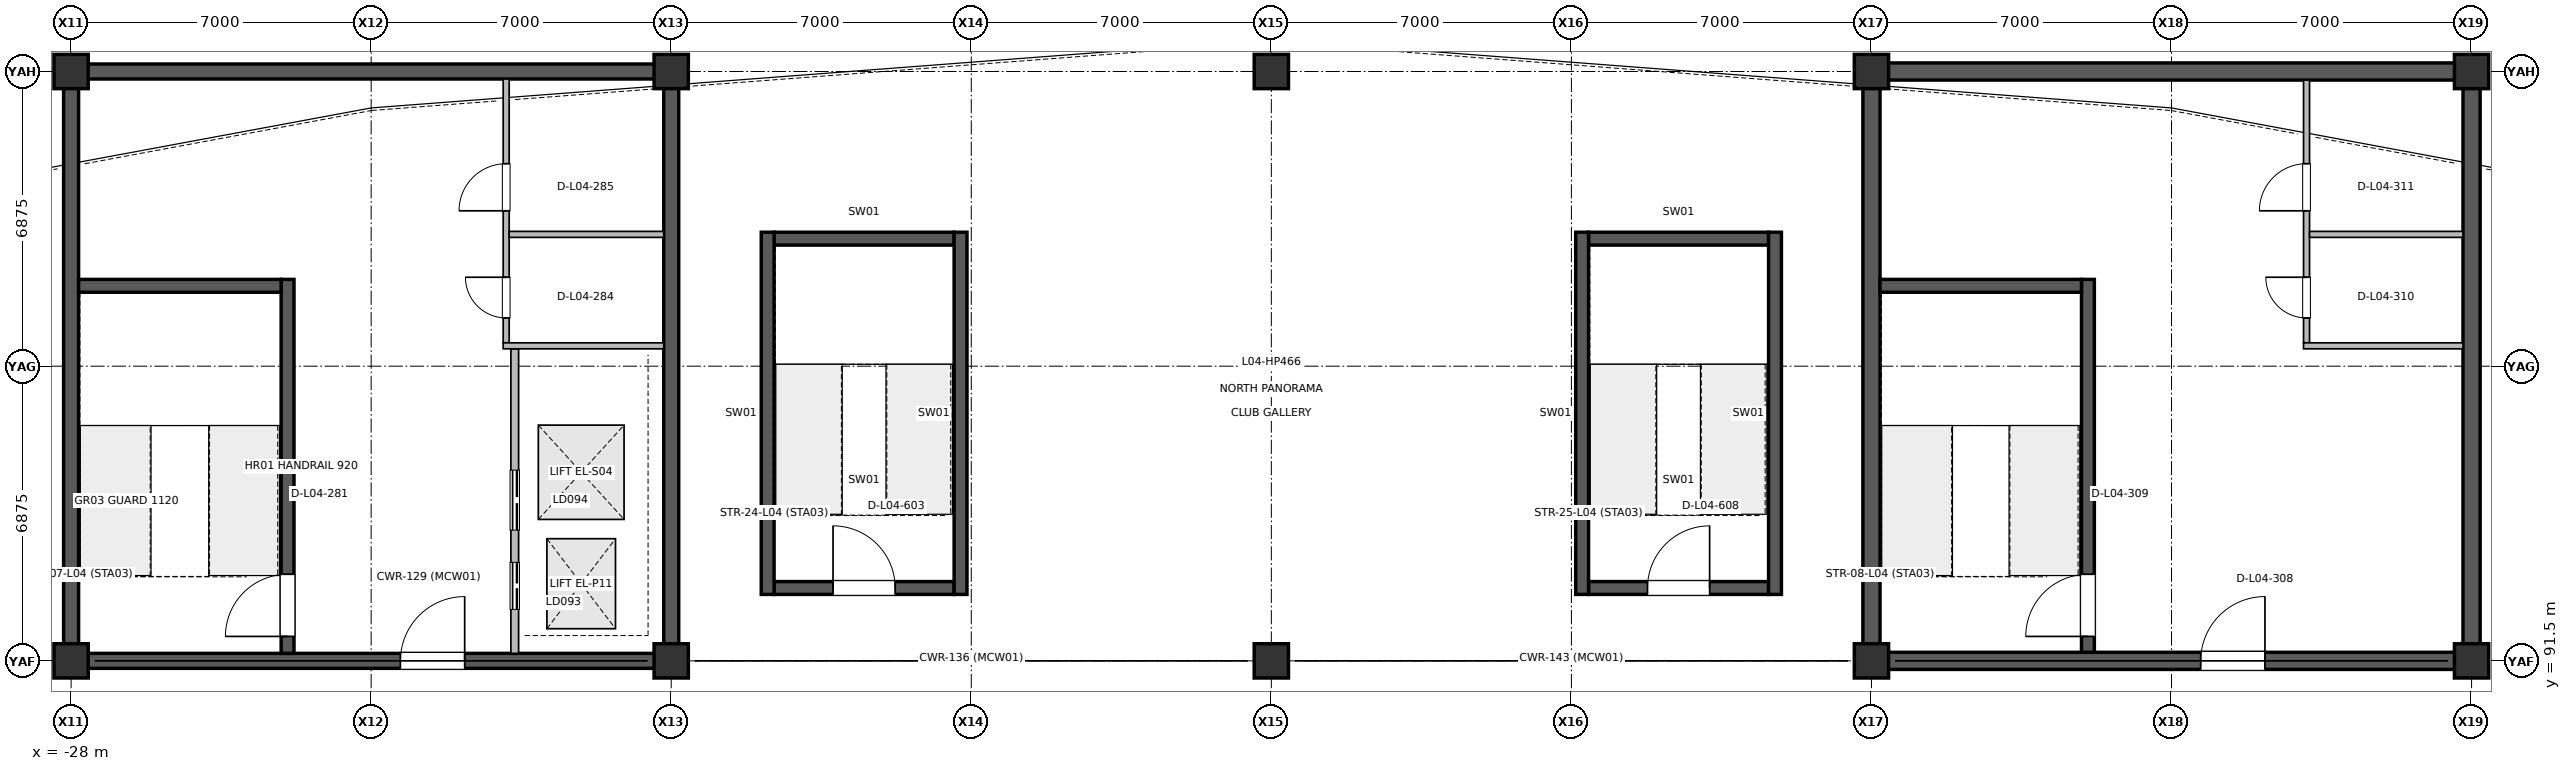
"""IFC4 building model, lengths in metres.
Left out: names, types, materials, properties, quantities, classifications, styles, units other than length and angle.
Written with IfcOpenShell. Run it as: python <this file> out.ifc"""

import sys

from ifc_helpers import new_model, si_unit, direction, frame, frame_2d, origin, origin_2d, place, context, subcontext, project, spatial, rectangle, circle, extrude, element, fill, save


model = new_model("IFC4")
c1 = context("Model", 3, precision=1e-05, world=origin(), true_north=direction((0.0, 1.0)))
c2 = subcontext(c1, "Body", "Model", "MODEL_VIEW")
j1 = project(units=[si_unit("LENGTHUNIT", "METRE"), si_unit("PLANEANGLEUNIT", "RADIAN")], contexts=[c1])
p1 = place(None, origin())
s1 = spatial("IfcSite", under=j1, at=p1, CompositionType="ELEMENT")
p2 = place(p1, origin())
s2 = spatial("IfcBuilding", under=s1, at=p2, CompositionType="ELEMENT")
p3 = place(p2, frame((0.0, 0.0, 16.2)))
s3 = spatial("IfcBuildingStorey", under=s2, at=p3, CompositionType="ELEMENT", Elevation=16.2)
for number, where, z_axis, x_axis in (
    (1, (-28.0, 91.5, 0.0), (0.0, 0.0, 1.0), (1.0, 0.0, 0.0)),
    (2, (-28.0, 105.25, 0.0), (0.0, 0.0, 1.0), (1.0, 0.0, 0.0)),
    (3, (-14.0, 91.5, 0.0), (0.0, 0.0, 1.0), (1.0, 0.0, 0.0)),
    (4, (-14.0, 105.25, 0.0), (0.0, 0.0, 1.0), (1.0, 0.0, 0.0)),
    (5, (0.0, 91.5, 0.0), (0.0, 0.0, 1.0), (1.0, 0.0, 0.0)),
    (6, (0.0, 105.25, 0.0), (0.0, 0.0, 1.0), (1.0, 0.0, 0.0)),
    (7, (14.0, 91.5, 0.0), (0.0, 0.0, 1.0), (1.0, 0.0, 0.0)),
    (8, (14.0, 105.25, 0.0), (0.0, 0.0, 1.0), (1.0, 0.0, 0.0)),
    (9, (28.0, 91.5, 0.0), (0.0, 0.0, 1.0), (1.0, 0.0, 0.0)),
    (10, (28.0, 105.25, 0.0), (0.0, 0.0, 1.0), (1.0, 0.0, 0.0)),
):
    element("IfcColumn", number, at=place(p3, frame(where, z_axis=z_axis, x_axis=x_axis)), inside=s3, PredefinedType="COLUMN", context=c2, shape_type="SweptSolid", body=[
        extrude(circle(Radius=0.4, at=origin_2d()), origin(), (0.0, 0.0, 1.0), 4.798),
    ])
for number, where, z_axis, x_axis in (
    (11, (-28.0, 91.675, 0.0), (0.0, 0.0, 1.0), (0.0, 1.0, 0.0)),
    (12, (-14.0, 91.675, 0.0), (0.0, 0.0, 1.0), (0.0, 1.0, 0.0)),
):
    element("IfcWall", number, at=place(p3, frame(where, z_axis=z_axis, x_axis=x_axis)), inside=s3, PredefinedType="SHEAR", context=c2, shape_type="SweptSolid", body=[
        extrude(rectangle(XDim=13.4, YDim=0.35, at=frame_2d((6.7, 0.0))), origin(), (0.0, 0.0, 1.0), 4.62),
    ])
p4 = place(p3, frame((-27.825, 91.5, 0.0), z_axis=(0.0, 0.0, 1.0), x_axis=(1.0, 0.0, 0.0)))
e13 = element("IfcWall", 13, at=p4, inside=s3, PredefinedType="SHEAR", context=c2, shape_type="SweptSolid", body=[
    extrude(rectangle(XDim=13.65, YDim=0.35, at=frame_2d((6.825, 0.0))), origin(), (0.0, 0.0, 1.0), 4.62),
])
p5 = place(p4, frame((7.507, 0.0, 0.0)))
e14 = element("IfcOpeningElement", 14, at=p5, cuts=e13, PredefinedType="OPENING", context=c2, shape_type="SweptSolid", body=[
    extrude(rectangle(XDim=1.5, YDim=2.2, at=frame_2d((0.75, 1.1))), frame((0.0, 0.185, 0.0), z_axis=(0.0, -1.0, 0.0), x_axis=(1.0, 0.0, 0.0)), (0.0, 0.0, 1.0), 0.37),
])
p6 = place(p3, frame((-27.825, 105.25, 0.0), z_axis=(0.0, 0.0, 1.0), x_axis=(1.0, 0.0, 0.0)))
e15 = element("IfcWall", 15, at=p6, inside=s3, PredefinedType="SHEAR", context=c2, shape_type="SweptSolid", body=[
    extrude(rectangle(XDim=13.65, YDim=0.35, at=frame_2d((6.825, 0.0))), origin(), (0.0, 0.0, 1.0), 4.62),
])
for number, where, z_axis, x_axis in (
    (16, (14.0, 91.7, 0.0), (0.0, 0.0, 1.0), (0.0, 1.0, 0.0)),
    (17, (28.0, 91.7, 0.0), (0.0, 0.0, 1.0), (0.0, 1.0, 0.0)),
):
    element("IfcWall", number, at=place(p3, frame(where, z_axis=z_axis, x_axis=x_axis)), inside=s3, PredefinedType="SHEAR", context=c2, shape_type="SweptSolid", body=[
        extrude(rectangle(XDim=13.35, YDim=0.4, at=frame_2d((6.675, 0.0))), origin(), (0.0, 0.0, 1.0), 4.62),
    ])
p7 = place(p3, frame((14.2, 91.5, 0.0), z_axis=(0.0, 0.0, 1.0), x_axis=(1.0, 0.0, 0.0)))
e18 = element("IfcWall", 18, at=p7, inside=s3, PredefinedType="SHEAR", context=c2, shape_type="SweptSolid", body=[
    extrude(rectangle(XDim=13.6, YDim=0.4, at=frame_2d((6.8, 0.0))), origin(), (0.0, 0.0, 1.0), 4.62),
])
p8 = place(p7, frame((7.48, 0.0, 0.0)))
e19 = element("IfcOpeningElement", 19, at=p8, cuts=e18, PredefinedType="OPENING", context=c2, shape_type="SweptSolid", body=[
    extrude(rectangle(XDim=1.5, YDim=2.2, at=frame_2d((0.75, 1.1))), frame((0.0, 0.21, 0.0), z_axis=(0.0, -1.0, 0.0), x_axis=(1.0, 0.0, 0.0)), (0.0, 0.0, 1.0), 0.42),
])
p9 = place(p3, frame((14.2, 105.25, 0.0), z_axis=(0.0, 0.0, 1.0), x_axis=(1.0, 0.0, 0.0)))
e20 = element("IfcWall", 20, at=p9, inside=s3, PredefinedType="SHEAR", context=c2, shape_type="SweptSolid", body=[
    extrude(rectangle(XDim=13.6, YDim=0.4, at=frame_2d((6.8, 0.0))), origin(), (0.0, 0.0, 1.0), 4.62),
])
p10 = place(p3, frame((-22.95, 91.675, 0.0), z_axis=(0.0, 0.0, 1.0), x_axis=(0.0, 1.0, 0.0)))
e21 = element("IfcWall", 21, at=p10, inside=s3, PredefinedType="SHEAR", context=c2, shape_type="SweptSolid", body=[
    extrude(rectangle(XDim=8.725, YDim=0.3, at=frame_2d((4.362, 0.0))), origin(), (0.0, 0.0, 1.0), 4.62),
])
p11 = place(p10, frame((0.395, 0.0, 0.0)))
e22 = element("IfcOpeningElement", 22, at=p11, cuts=e21, PredefinedType="OPENING", context=c2, shape_type="SweptSolid", body=[
    extrude(rectangle(XDim=1.45, YDim=2.2, at=frame_2d((0.725, 1.1))), frame((0.0, 0.16, 0.0), z_axis=(0.0, -1.0, 0.0), x_axis=(1.0, 0.0, 0.0)), (0.0, 0.0, 1.0), 0.32),
])
p12 = place(p3, frame((-17.65, 91.675, 0.0), z_axis=(0.0, 0.0, 1.0), x_axis=(0.0, 1.0, 0.0)))
e23 = element("IfcWall", 23, at=p12, inside=s3, PredefinedType="PARTITIONING", context=c2, shape_type="SweptSolid", body=[
    extrude(rectangle(XDim=7.105, YDim=0.18, at=frame_2d((3.552, 0.0))), origin(), (0.0, 0.0, 1.0), 3.82),
])
p13 = place(p12, frame((1.025, 0.0, 0.0)))
e24 = element("IfcOpeningElement", 24, at=p13, cuts=e23, PredefinedType="OPENING", context=c2, shape_type="SweptSolid", body=[
    extrude(rectangle(XDim=1.1, YDim=2.2, at=frame_2d((0.55, 1.1))), frame((0.0, 0.1, 0.0), z_axis=(0.0, -1.0, 0.0), x_axis=(1.0, 0.0, 0.0)), (0.0, 0.0, 1.0), 0.2),
])
p14 = place(p12, frame((2.875, 0.0, 0.0)))
e25 = element("IfcOpeningElement", 25, at=p14, cuts=e23, PredefinedType="OPENING", context=c2, shape_type="SweptSolid", body=[
    extrude(rectangle(XDim=1.4, YDim=2.3, at=frame_2d((0.7, 1.15))), frame((0.0, 0.1, 0.0), z_axis=(0.0, -1.0, 0.0), x_axis=(1.0, 0.0, 0.0)), (0.0, 0.0, 1.0), 0.2),
])
p15 = place(p3, frame((-17.85, 98.92, 0.0), z_axis=(0.0, 0.0, 1.0), x_axis=(0.0, 1.0, 0.0)))
e26 = element("IfcWall", 26, at=p15, inside=s3, PredefinedType="PARTITIONING", context=c2, shape_type="SweptSolid", body=[
    extrude(rectangle(XDim=6.155, YDim=0.14, at=frame_2d((3.078, 0.0))), origin(), (0.0, 0.0, 1.0), 3.82),
])
p16 = place(p15, frame((0.58, 0.0, 0.0)))
e27 = element("IfcOpeningElement", 27, at=p16, cuts=e26, PredefinedType="OPENING", context=c2, shape_type="SweptSolid", body=[
    extrude(rectangle(XDim=0.95, YDim=2.15, at=frame_2d((0.475, 1.075))), frame((0.0, 0.08, 0.0), z_axis=(0.0, -1.0, 0.0), x_axis=(1.0, 0.0, 0.0)), (0.0, 0.0, 1.0), 0.16),
])
p17 = place(p15, frame((3.08, 0.0, 0.0)))
e28 = element("IfcOpeningElement", 28, at=p17, cuts=e26, PredefinedType="OPENING", context=c2, shape_type="SweptSolid", body=[
    extrude(rectangle(XDim=1.1, YDim=2.15, at=frame_2d((0.55, 1.075))), frame((0.0, 0.08, 0.0), z_axis=(0.0, -1.0, 0.0), x_axis=(1.0, 0.0, 0.0)), (0.0, 0.0, 1.0), 0.16),
])
p18 = place(p3, frame((19.05, 91.7, 0.0), z_axis=(0.0, 0.0, 1.0), x_axis=(0.0, 1.0, 0.0)))
e29 = element("IfcWall", 29, at=p18, inside=s3, PredefinedType="SHEAR", context=c2, shape_type="SweptSolid", body=[
    extrude(rectangle(XDim=8.7, YDim=0.3, at=frame_2d((4.35, 0.0))), origin(), (0.0, 0.0, 1.0), 4.62),
])
p19 = place(p18, frame((0.37, 0.0, 0.0)))
e30 = element("IfcOpeningElement", 30, at=p19, cuts=e29, PredefinedType="OPENING", context=c2, shape_type="SweptSolid", body=[
    extrude(rectangle(XDim=1.45, YDim=2.2, at=frame_2d((0.725, 1.1))), frame((0.0, 0.16, 0.0), z_axis=(0.0, -1.0, 0.0), x_axis=(1.0, 0.0, 0.0)), (0.0, 0.0, 1.0), 0.32),
])
p20 = place(p3, frame((24.15, 98.92, 0.0), z_axis=(0.0, 0.0, 1.0), x_axis=(0.0, 1.0, 0.0)))
e31 = element("IfcWall", 31, at=p20, inside=s3, PredefinedType="PARTITIONING", context=c2, shape_type="SweptSolid", body=[
    extrude(rectangle(XDim=6.13, YDim=0.14, at=frame_2d((3.065, 0.0))), origin(), (0.0, 0.0, 1.0), 3.82),
])
p21 = place(p20, frame((0.58, 0.0, 0.0)))
e32 = element("IfcOpeningElement", 32, at=p21, cuts=e31, PredefinedType="OPENING", context=c2, shape_type="SweptSolid", body=[
    extrude(rectangle(XDim=0.95, YDim=2.15, at=frame_2d((0.475, 1.075))), frame((0.0, 0.08, 0.0), z_axis=(0.0, -1.0, 0.0), x_axis=(1.0, 0.0, 0.0)), (0.0, 0.0, 1.0), 0.16),
])
p22 = place(p20, frame((3.08, 0.0, 0.0)))
e33 = element("IfcOpeningElement", 33, at=p22, cuts=e31, PredefinedType="OPENING", context=c2, shape_type="SweptSolid", body=[
    extrude(rectangle(XDim=1.1, YDim=2.15, at=frame_2d((0.55, 1.075))), frame((0.0, 0.08, 0.0), z_axis=(0.0, -1.0, 0.0), x_axis=(1.0, 0.0, 0.0)), (0.0, 0.0, 1.0), 0.16),
])
p23 = place(p3, frame((-17.92, 98.85, 0.0), z_axis=(0.0, 0.0, 1.0), x_axis=(1.0, 0.0, 0.0)))
e34 = element("IfcWall", 34, at=p23, inside=s3, PredefinedType="PARTITIONING", context=c2, shape_type="SweptSolid", body=[
    extrude(rectangle(XDim=3.745, YDim=0.14, at=frame_2d((1.873, 0.0))), origin(), (0.0, 0.0, 1.0), 3.82),
])
p24 = place(p3, frame((-17.78, 101.45, 0.0), z_axis=(0.0, 0.0, 1.0), x_axis=(1.0, 0.0, 0.0)))
e35 = element("IfcWall", 35, at=p24, inside=s3, PredefinedType="PARTITIONING", context=c2, shape_type="SweptSolid", body=[
    extrude(rectangle(XDim=3.605, YDim=0.14, at=frame_2d((1.802, 0.0))), origin(), (0.0, 0.0, 1.0), 3.82),
])
p25 = place(p3, frame((24.08, 98.85, 0.0), z_axis=(0.0, 0.0, 1.0), x_axis=(1.0, 0.0, 0.0)))
e36 = element("IfcWall", 36, at=p25, inside=s3, PredefinedType="PARTITIONING", context=c2, shape_type="SweptSolid", body=[
    extrude(rectangle(XDim=3.72, YDim=0.14, at=frame_2d((1.86, 0.0))), origin(), (0.0, 0.0, 1.0), 3.82),
])
p26 = place(p3, frame((24.22, 101.45, 0.0), z_axis=(0.0, 0.0, 1.0), x_axis=(1.0, 0.0, 0.0)))
e37 = element("IfcWall", 37, at=p26, inside=s3, PredefinedType="PARTITIONING", context=c2, shape_type="SweptSolid", body=[
    extrude(rectangle(XDim=3.58, YDim=0.14, at=frame_2d((1.79, 0.0))), origin(), (0.0, 0.0, 1.0), 3.82),
])
p27 = place(p3, frame((-27.825, 100.25, 0.0), z_axis=(0.0, 0.0, 1.0), x_axis=(1.0, 0.0, 0.0)))
e38 = element("IfcWall", 38, at=p27, inside=s3, PredefinedType="SHEAR", context=c2, shape_type="SweptSolid", body=[
    extrude(rectangle(XDim=4.725, YDim=0.3, at=frame_2d((2.362, 0.0))), origin(), (0.0, 0.0, 1.0), 4.62),
])
p28 = place(p3, frame((14.2, 100.25, 0.0), z_axis=(0.0, 0.0, 1.0), x_axis=(1.0, 0.0, 0.0)))
e39 = element("IfcWall", 39, at=p28, inside=s3, PredefinedType="SHEAR", context=c2, shape_type="SweptSolid", body=[
    extrude(rectangle(XDim=4.7, YDim=0.3, at=frame_2d((2.35, 0.0))), origin(), (0.0, 0.0, 1.0), 4.62),
])
p29 = place(p3, frame((-11.6, 93.2, 0.0), z_axis=(0.0, 0.0, 1.0), x_axis=(1.0, 0.0, 0.0)))
e40 = element("IfcWall", 40, at=p29, inside=s3, PredefinedType="SHEAR", context=c2, shape_type="SweptSolid", body=[
    extrude(rectangle(XDim=4.2, YDim=0.3, at=frame_2d((2.1, 0.0))), origin(), (0.0, 0.0, 1.0), 4.62),
])
p30 = place(p29, frame((1.375, 0.0, 0.0)))
e41 = element("IfcOpeningElement", 41, at=p30, cuts=e40, PredefinedType="OPENING", context=c2, shape_type="SweptSolid", body=[
    extrude(rectangle(XDim=1.45, YDim=2.2, at=frame_2d((0.725, 1.1))), frame((0.0, 0.16, 0.0), z_axis=(0.0, -1.0, 0.0), x_axis=(1.0, 0.0, 0.0)), (0.0, 0.0, 1.0), 0.32),
])
p31 = place(p3, frame((-11.6, 101.35, 0.0), z_axis=(0.0, 0.0, 1.0), x_axis=(1.0, 0.0, 0.0)))
e42 = element("IfcWall", 42, at=p31, inside=s3, PredefinedType="SHEAR", context=c2, shape_type="SweptSolid", body=[
    extrude(rectangle(XDim=4.2, YDim=0.3, at=frame_2d((2.1, 0.0))), origin(), (0.0, 0.0, 1.0), 4.62),
])
for number, where, z_axis, x_axis in (
    (43, (-11.75, 93.05, 0.0), (0.0, 0.0, 1.0), (0.0, 1.0, 0.0)),
    (44, (-7.25, 93.05, 0.0), (0.0, 0.0, 1.0), (0.0, 1.0, 0.0)),
):
    element("IfcWall", number, at=place(p3, frame(where, z_axis=z_axis, x_axis=x_axis)), inside=s3, PredefinedType="SHEAR", context=c2, shape_type="SweptSolid", body=[
        extrude(rectangle(XDim=8.45, YDim=0.3, at=frame_2d((4.225, 0.0))), origin(), (0.0, 0.0, 1.0), 4.62),
    ])
p32 = place(p3, frame((7.4, 93.2, 0.0), z_axis=(0.0, 0.0, 1.0), x_axis=(1.0, 0.0, 0.0)))
e45 = element("IfcWall", 45, at=p32, inside=s3, PredefinedType="SHEAR", context=c2, shape_type="SweptSolid", body=[
    extrude(rectangle(XDim=4.2, YDim=0.3, at=frame_2d((2.1, 0.0))), origin(), (0.0, 0.0, 1.0), 4.62),
])
p33 = place(p32, frame((1.375, 0.0, 0.0)))
e46 = element("IfcOpeningElement", 46, at=p33, cuts=e45, PredefinedType="OPENING", context=c2, shape_type="SweptSolid", body=[
    extrude(rectangle(XDim=1.45, YDim=2.2, at=frame_2d((0.725, 1.1))), frame((0.0, 0.16, 0.0), z_axis=(0.0, -1.0, 0.0), x_axis=(1.0, 0.0, 0.0)), (0.0, 0.0, 1.0), 0.32),
])
p34 = place(p3, frame((7.4, 101.35, 0.0), z_axis=(0.0, 0.0, 1.0), x_axis=(1.0, 0.0, 0.0)))
e47 = element("IfcWall", 47, at=p34, inside=s3, PredefinedType="SHEAR", context=c2, shape_type="SweptSolid", body=[
    extrude(rectangle(XDim=4.2, YDim=0.3, at=frame_2d((2.1, 0.0))), origin(), (0.0, 0.0, 1.0), 4.62),
])
for number, where, z_axis, x_axis in (
    (48, (7.25, 93.05, 0.0), (0.0, 0.0, 1.0), (0.0, 1.0, 0.0)),
    (49, (11.75, 93.05, 0.0), (0.0, 0.0, 1.0), (0.0, 1.0, 0.0)),
):
    element("IfcWall", number, at=place(p3, frame(where, z_axis=z_axis, x_axis=x_axis)), inside=s3, PredefinedType="SHEAR", context=c2, shape_type="SweptSolid", body=[
        extrude(rectangle(XDim=8.45, YDim=0.3, at=frame_2d((4.225, 0.0))), origin(), (0.0, 0.0, 1.0), 4.62),
    ])
p35 = place(p5, origin())
e50 = element("IfcDoor", 50, at=p35, inside=s3, OperationType="SINGLE_SWING_RIGHT", PredefinedType="DOOR", context=c2, shape_type="SweptSolid", body=[
    extrude(rectangle(XDim=1.5, YDim=2.2, at=frame_2d((0.75, 1.1))), frame((0.0, 0.025, 0.0), z_axis=(0.0, -1.0, 0.0), x_axis=(1.0, 0.0, 0.0)), (0.0, 0.0, 1.0), 0.05),
])
fill(e14, e50)
p36 = place(p11, origin())
e51 = element("IfcDoor", 51, at=p36, inside=s3, OperationType="SINGLE_SWING_LEFT", PredefinedType="DOOR", context=c2, shape_type="SweptSolid", body=[
    extrude(rectangle(XDim=1.45, YDim=2.2, at=frame_2d((0.725, 1.1))), frame((0.0, 0.025, 0.0), z_axis=(0.0, -1.0, 0.0), x_axis=(1.0, 0.0, 0.0)), (0.0, 0.0, 1.0), 0.05),
])
fill(e22, e51)
p37 = place(p13, origin())
e52 = element("IfcDoor", 52, at=p37, inside=s3, OperationType="DOUBLE_DOOR_SLIDING", PredefinedType="DOOR", context=c2, shape_type="SweptSolid", body=[
    extrude(rectangle(XDim=1.1, YDim=2.2, at=frame_2d((0.55, 1.1))), frame((0.0, 0.025, 0.0), z_axis=(0.0, -1.0, 0.0), x_axis=(1.0, 0.0, 0.0)), (0.0, 0.0, 1.0), 0.05),
])
fill(e24, e52)
p38 = place(p14, origin())
e53 = element("IfcDoor", 53, at=p38, inside=s3, OperationType="DOUBLE_DOOR_SLIDING", PredefinedType="DOOR", context=c2, shape_type="SweptSolid", body=[
    extrude(rectangle(XDim=1.4, YDim=2.3, at=frame_2d((0.7, 1.15))), frame((0.0, 0.025, 0.0), z_axis=(0.0, -1.0, 0.0), x_axis=(1.0, 0.0, 0.0)), (0.0, 0.0, 1.0), 0.05),
])
fill(e25, e53)
p39 = place(p16, origin())
e54 = element("IfcDoor", 54, at=p39, inside=s3, OperationType="SINGLE_SWING_RIGHT", PredefinedType="DOOR", context=c2, shape_type="SweptSolid", body=[
    extrude(rectangle(XDim=0.95, YDim=2.15, at=frame_2d((0.475, 1.075))), frame((0.0, 0.025, 0.0), z_axis=(0.0, -1.0, 0.0), x_axis=(1.0, 0.0, 0.0)), (0.0, 0.0, 1.0), 0.05),
])
fill(e27, e54)
p40 = place(p17, origin())
e55 = element("IfcDoor", 55, at=p40, inside=s3, OperationType="SINGLE_SWING_LEFT", PredefinedType="DOOR", context=c2, shape_type="SweptSolid", body=[
    extrude(rectangle(XDim=1.1, YDim=2.15, at=frame_2d((0.55, 1.075))), frame((0.0, 0.025, 0.0), z_axis=(0.0, -1.0, 0.0), x_axis=(1.0, 0.0, 0.0)), (0.0, 0.0, 1.0), 0.05),
])
fill(e28, e55)
p41 = place(p8, origin())
e56 = element("IfcDoor", 56, at=p41, inside=s3, OperationType="SINGLE_SWING_RIGHT", PredefinedType="DOOR", context=c2, shape_type="SweptSolid", body=[
    extrude(rectangle(XDim=1.5, YDim=2.2, at=frame_2d((0.75, 1.1))), frame((0.0, 0.025, 0.0), z_axis=(0.0, -1.0, 0.0), x_axis=(1.0, 0.0, 0.0)), (0.0, 0.0, 1.0), 0.05),
])
fill(e19, e56)
p42 = place(p19, origin())
e57 = element("IfcDoor", 57, at=p42, inside=s3, OperationType="SINGLE_SWING_LEFT", PredefinedType="DOOR", context=c2, shape_type="SweptSolid", body=[
    extrude(rectangle(XDim=1.45, YDim=2.2, at=frame_2d((0.725, 1.1))), frame((0.0, 0.025, 0.0), z_axis=(0.0, -1.0, 0.0), x_axis=(1.0, 0.0, 0.0)), (0.0, 0.0, 1.0), 0.05),
])
fill(e30, e57)
p43 = place(p21, origin())
e58 = element("IfcDoor", 58, at=p43, inside=s3, OperationType="SINGLE_SWING_RIGHT", PredefinedType="DOOR", context=c2, shape_type="SweptSolid", body=[
    extrude(rectangle(XDim=0.95, YDim=2.15, at=frame_2d((0.475, 1.075))), frame((0.0, 0.025, 0.0), z_axis=(0.0, -1.0, 0.0), x_axis=(1.0, 0.0, 0.0)), (0.0, 0.0, 1.0), 0.05),
])
fill(e32, e58)
p44 = place(p22, origin())
e59 = element("IfcDoor", 59, at=p44, inside=s3, OperationType="SINGLE_SWING_LEFT", PredefinedType="DOOR", context=c2, shape_type="SweptSolid", body=[
    extrude(rectangle(XDim=1.1, YDim=2.15, at=frame_2d((0.55, 1.075))), frame((0.0, 0.025, 0.0), z_axis=(0.0, -1.0, 0.0), x_axis=(1.0, 0.0, 0.0)), (0.0, 0.0, 1.0), 0.05),
])
fill(e33, e59)
p45 = place(p30, origin())
e60 = element("IfcDoor", 60, at=p45, inside=s3, OperationType="SINGLE_SWING_LEFT", PredefinedType="DOOR", context=c2, shape_type="SweptSolid", body=[
    extrude(rectangle(XDim=1.45, YDim=2.2, at=frame_2d((0.725, 1.1))), frame((0.0, 0.025, 0.0), z_axis=(0.0, -1.0, 0.0), x_axis=(1.0, 0.0, 0.0)), (0.0, 0.0, 1.0), 0.05),
])
fill(e41, e60)
p46 = place(p33, origin())
e61 = element("IfcDoor", 61, at=p46, inside=s3, OperationType="SINGLE_SWING_RIGHT", PredefinedType="DOOR", context=c2, shape_type="SweptSolid", body=[
    extrude(rectangle(XDim=1.45, YDim=2.2, at=frame_2d((0.725, 1.1))), frame((0.0, 0.025, 0.0), z_axis=(0.0, -1.0, 0.0), x_axis=(1.0, 0.0, 0.0)), (0.0, 0.0, 1.0), 0.05),
])
fill(e46, e61)
save(model, sys.argv[1])
